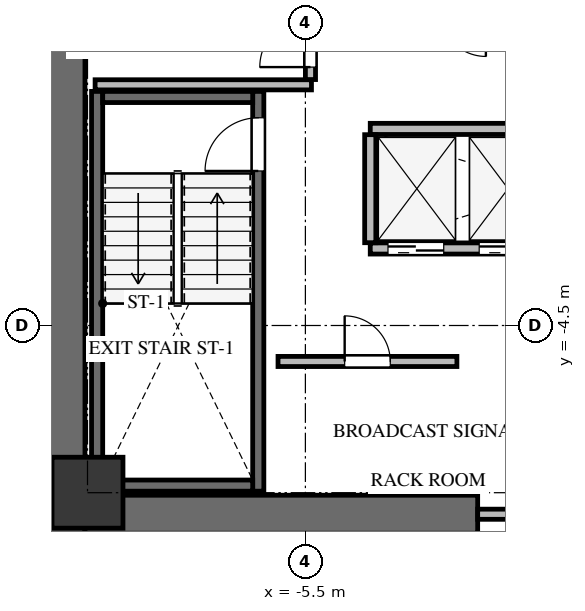
"""IFC4 building model, lengths in metres.
Left out: names, types, materials, properties, quantities, classifications, styles, units other than length and angle.
Written with IfcOpenShell. Run it as: python <this file> out.ifc"""

import sys

from ifc_helpers import new_model, si_unit, direction, frame, frame_2d, origin, origin_2d, place, context, subcontext, project, spatial, rectangle, extrude, source, transform, mapped, element, fill, save


model = new_model("IFC4")
c1 = context("Model", 3, precision=1e-05, world=origin(), true_north=direction((0.0, 1.0)))
c2 = subcontext(c1, "Body", "Model", "MODEL_VIEW")
j1 = project(units=[si_unit("LENGTHUNIT", "METRE"), si_unit("PLANEANGLEUNIT", "RADIAN")], contexts=[c1])
p1 = place(None, origin())
s1 = spatial("IfcSite", under=j1, at=p1, CompositionType="ELEMENT")
p2 = place(p1, origin())
s2 = spatial("IfcBuilding", under=s1, at=p2, CompositionType="ELEMENT")
p3 = place(p2, frame((0.0, 0.0, 114.0)))
s3 = spatial("IfcBuildingStorey", under=s2, at=p3, CompositionType="ELEMENT", Elevation=114.0)
p4 = place(p3, frame((-10.225, -8.6, 0.0), z_axis=(0.0, 0.0, 1.0), x_axis=(0.0, 1.0, 0.0)))
e1 = element("IfcWall", 1, at=p4, inside=s3, PredefinedType="SHEAR", context=c2, shape_type="SweptSolid", body=[
    extrude(rectangle(XDim=17.2, YDim=0.75, at=frame_2d((8.6, 0.0))), origin(), (0.0, 0.0, 1.0), 3.3),
])
p5 = place(p3, frame((-9.85, -8.225, 0.0), z_axis=(0.0, 0.0, 1.0), x_axis=(1.0, 0.0, 0.0)))
e2 = element("IfcWall", 2, at=p5, inside=s3, PredefinedType="SHEAR", context=c2, shape_type="SweptSolid", body=[
    extrude(rectangle(XDim=7.75, YDim=0.75, at=frame_2d((3.875, 0.0))), origin(), (0.0, 0.0, 1.0), 3.3),
])
p6 = place(p3, frame((-6.43, -7.77, -0.24), z_axis=(0.0, 0.0, 1.0), x_axis=(0.0, 1.0, 0.0)))
e3 = element("IfcWall", 3, at=p6, inside=s3, PredefinedType="SHEAR", context=c2, shape_type="SweptSolid", body=[
    extrude(rectangle(XDim=7.89, YDim=0.22, at=frame_2d((3.945, 0.0))), origin(), (0.0, 0.0, 1.0), 3.3),
])
p7 = place(p6, frame((6.32, 0.0, 0.0)))
e4 = element("IfcOpeningElement", 4, at=p7, cuts=e3, PredefinedType="OPENING", context=c2, shape_type="SweptSolid", body=[
    extrude(rectangle(XDim=1.05, YDim=2.15, at=frame_2d((0.525, 1.075))), frame((0.0, 0.12, 0.0), z_axis=(0.0, -1.0, 0.0), x_axis=(1.0, 0.0, 0.0)), (0.0, 0.0, 1.0), 0.24),
])
p8 = place(p3, frame((-9.61, 0.12, -0.24), z_axis=(0.0, 0.0, 1.0), x_axis=(0.0, -1.0, 0.0)))
e5 = element("IfcWall", 5, at=p8, inside=s3, PredefinedType="SHEAR", context=c2, shape_type="SweptSolid", body=[
    extrude(rectangle(XDim=7.89, YDim=0.22, at=frame_2d((3.945, 0.0))), origin(), (0.0, 0.0, 1.0), 3.3),
])
for number, where, z_axis, x_axis in (
    (6, (-9.5, -7.66, -0.24), (0.0, 0.0, 1.0), (1.0, 0.0, 0.0)),
    (7, (-6.54, 0.01, -0.24), (0.0, 0.0, 1.0), (-1.0, 0.0, 0.0)),
):
    element("IfcWall", number, at=place(p3, frame(where, z_axis=z_axis, x_axis=x_axis)), inside=s3, PredefinedType="SHEAR", context=c2, shape_type="SweptSolid", body=[
        extrude(rectangle(XDim=2.96, YDim=0.22, at=frame_2d((1.48, 0.0))), origin(), (0.0, 0.0, 1.0), 3.3),
    ])
m1 = source(origin(), c2, "Body", "SweptSolid", [
    extrude(rectangle(XDim=1.4, YDim=1.4, at=origin_2d()), origin(), (0.0, 0.0, 1.0), 3.3),
])
p9 = place(p3, frame((-9.8, -7.8, -0.24), z_axis=(0.0, 0.0, 1.0), x_axis=(1.0, 0.0, 0.0)))
e8 = element("IfcColumn", 8, at=p9, inside=s3, PredefinedType="COLUMN", context=c2, shape_type="MappedRepresentation", body=[
    mapped(m1, transform((0.0, 0.0, 0.0), x_axis=(1.0, 0.0, 0.0), y_axis=(0.0, 1.0, 0.0), z_axis=(0.0, 0.0, 1.0), scale=1.0)),
])
p10 = place(p3, frame((-2.1, -8.225, 0.0), z_axis=(0.0, 0.0, 1.0), x_axis=(1.0, 0.0, 0.0)))
e9 = element("IfcWall", 9, at=p10, inside=s3, PredefinedType="SOLIDWALL", context=c2, shape_type="SweptSolid", body=[
    extrude(rectangle(XDim=4.2, YDim=0.2, at=frame_2d((2.1, 0.0))), origin(), (0.0, 0.0, 1.0), 3.045),
])
p11 = place(p10, frame((1.2, 0.0, 0.0)))
e10 = element("IfcOpeningElement", 10, at=p11, cuts=e9, PredefinedType="OPENING", context=c2, shape_type="SweptSolid", body=[
    extrude(rectangle(XDim=1.8, YDim=2.15, at=frame_2d((0.9, 1.075))), frame((0.0, 0.11, 0.0), z_axis=(0.0, -1.0, 0.0), x_axis=(1.0, 0.0, 0.0)), (0.0, 0.0, 1.0), 0.22),
])
p12 = place(p3, frame((-9.65, 0.25, 0.0), z_axis=(0.0, 0.0, 1.0), x_axis=(1.0, 0.0, 0.0)))
e11 = element("IfcWall", 11, at=p12, inside=s3, PredefinedType="SOLIDWALL", context=c2, shape_type="SweptSolid", body=[
    extrude(rectangle(XDim=4.27, YDim=0.2, at=frame_2d((2.135, 0.0))), origin(), (0.0, 0.0, 1.0), 3.045),
])
p13 = place(p3, frame((-5.4, 0.354, 0.0), z_axis=(0.0, 0.0, 1.0), x_axis=(0.0, 1.0, 0.0)))
e12 = element("IfcWall", 12, at=p13, inside=s3, PredefinedType="SOLIDWALL", context=c2, shape_type="SweptSolid", body=[
    extrude(rectangle(XDim=4.026, YDim=0.2, at=frame_2d((2.013, 0.0))), origin(), (0.0, 0.0, 1.0), 3.045),
])
p14 = place(p13, frame((0.246, 0.0, 0.0)))
e13 = element("IfcOpeningElement", 13, at=p14, cuts=e12, PredefinedType="OPENING", context=c2, shape_type="SweptSolid", body=[
    extrude(rectangle(XDim=1.0, YDim=2.15, at=frame_2d((0.5, 1.075))), frame((0.0, 0.11, 0.0), z_axis=(0.0, -1.0, 0.0), x_axis=(1.0, 0.0, 0.0)), (0.0, 0.0, 1.0), 0.22),
])
p15 = place(p3, frame((-4.22, -2.98, 0.0), z_axis=(0.0, 0.0, 1.0), x_axis=(1.0, 0.0, 0.0)))
e14 = element("IfcWall", 14, at=p15, inside=s3, PredefinedType="SOLIDWALL", context=c2, shape_type="SweptSolid", body=[
    extrude(rectangle(XDim=7.24, YDim=0.22, at=frame_2d((3.62, 0.0))), origin(), (0.0, 0.0, 1.0), 3.045),
])
p16 = place(p15, frame((0.35, 0.0, 0.0)))
e15 = element("IfcOpeningElement", 15, at=p16, cuts=e14, PredefinedType="OPENING", context=c2, shape_type="SweptSolid", body=[
    extrude(rectangle(XDim=1.1, YDim=2.15, at=frame_2d((0.55, 1.075))), frame((0.0, 0.12, 0.0), z_axis=(0.0, -1.0, 0.0), x_axis=(1.0, 0.0, 0.0)), (0.0, 0.0, 1.0), 0.24),
])
p17 = place(p15, frame((2.15, 0.0, 0.0)))
e16 = element("IfcOpeningElement", 16, at=p17, cuts=e14, PredefinedType="OPENING", context=c2, shape_type="SweptSolid", body=[
    extrude(rectangle(XDim=1.1, YDim=2.15, at=frame_2d((0.55, 1.075))), frame((0.0, 0.12, 0.0), z_axis=(0.0, -1.0, 0.0), x_axis=(1.0, 0.0, 0.0)), (0.0, 0.0, 1.0), 0.24),
])
p18 = place(p15, frame((3.95, 0.0, 0.0)))
e17 = element("IfcOpeningElement", 17, at=p18, cuts=e14, PredefinedType="OPENING", context=c2, shape_type="SweptSolid", body=[
    extrude(rectangle(XDim=1.1, YDim=2.15, at=frame_2d((0.55, 1.075))), frame((0.0, 0.12, 0.0), z_axis=(0.0, -1.0, 0.0), x_axis=(1.0, 0.0, 0.0)), (0.0, 0.0, 1.0), 0.24),
])
p19 = place(p15, frame((5.75, 0.0, 0.0)))
e18 = element("IfcOpeningElement", 18, at=p19, cuts=e14, PredefinedType="OPENING", context=c2, shape_type="SweptSolid", body=[
    extrude(rectangle(XDim=1.1, YDim=2.15, at=frame_2d((0.55, 1.075))), frame((0.0, 0.12, 0.0), z_axis=(0.0, -1.0, 0.0), x_axis=(1.0, 0.0, 0.0)), (0.0, 0.0, 1.0), 0.24),
])
p20 = place(p3, frame((-4.22, -0.62, 0.0), z_axis=(0.0, 0.0, 1.0), x_axis=(1.0, 0.0, 0.0)))
e19 = element("IfcWall", 19, at=p20, inside=s3, PredefinedType="SOLIDWALL", context=c2, shape_type="SweptSolid", body=[
    extrude(rectangle(XDim=7.24, YDim=0.22, at=frame_2d((3.62, 0.0))), origin(), (0.0, 0.0, 1.0), 3.045),
])
p21 = place(p3, frame((-4.22, -2.866, 0.0), z_axis=(0.0, 0.0, 1.0), x_axis=(0.0, 1.0, 0.0)))
e20 = element("IfcWall", 20, at=p21, inside=s3, PredefinedType="SOLIDWALL", context=c2, shape_type="SweptSolid", body=[
    extrude(rectangle(XDim=2.132, YDim=0.22, at=frame_2d((1.066, 0.0))), origin(), (0.0, 0.0, 1.0), 3.045),
])
p22 = place(p3, frame((-6.04, -5.21, 0.0), z_axis=(0.0, 0.0, 1.0), x_axis=(1.0, 0.0, 0.0)))
e21 = element("IfcWall", 21, at=p22, inside=s3, PredefinedType="SOLIDWALL", context=c2, shape_type="SweptSolid", body=[
    extrude(rectangle(XDim=3.53, YDim=0.2, at=frame_2d((1.765, 0.0))), origin(), (0.0, 0.0, 1.0), 3.045),
])
p23 = place(p22, frame((1.315, 0.0, 0.0)))
e22 = element("IfcOpeningElement", 22, at=p23, cuts=e21, PredefinedType="OPENING", context=c2, shape_type="SweptSolid", body=[
    extrude(rectangle(XDim=0.9, YDim=2.05, at=frame_2d((0.45, 1.025))), frame((0.0, 0.11, 0.0), z_axis=(0.0, -1.0, 0.0), x_axis=(1.0, 0.0, 0.0)), (0.0, 0.0, 1.0), 0.22),
])
m2 = source(origin(), c2, "Body", "SweptSolid", [
    extrude(rectangle(XDim=1.05, YDim=2.15, at=frame_2d((0.525, 1.075))), frame((0.0, 0.025, 0.0), z_axis=(0.0, -1.0, 0.0), x_axis=(1.0, 0.0, 0.0)), (0.0, 0.0, 1.0), 0.05),
])
p24 = place(p7, origin())
e23 = element("IfcDoor", 23, at=p24, inside=s3, OperationType="SINGLE_SWING_LEFT", PredefinedType="DOOR", context=c2, shape_type="MappedRepresentation", body=[
    mapped(m2, transform((0.0, 0.0, 0.0), x_axis=(1.0, 0.0, 0.0), y_axis=(0.0, 1.0, 0.0), z_axis=(0.0, 0.0, 1.0), scale=1.0)),
])
fill(e4, e23)
m3 = source(origin(), c2, "Body", "SweptSolid", [
    extrude(rectangle(XDim=1.0, YDim=2.15, at=frame_2d((0.5, 1.075))), frame((0.0, 0.025, 0.0), z_axis=(0.0, -1.0, 0.0), x_axis=(1.0, 0.0, 0.0)), (0.0, 0.0, 1.0), 0.05),
])
p25 = place(p14, origin())
e24 = element("IfcDoor", 24, at=p25, inside=s3, OperationType="SINGLE_SWING_LEFT", PredefinedType="DOOR", context=c2, shape_type="MappedRepresentation", body=[
    mapped(m3, transform((0.0, 0.0, 0.0), x_axis=(1.0, 0.0, 0.0), y_axis=(0.0, 1.0, 0.0), z_axis=(0.0, 0.0, 1.0), scale=1.0)),
])
fill(e13, e24)
m4 = source(origin(), c2, "Body", "SweptSolid", [
    extrude(rectangle(XDim=1.1, YDim=2.15, at=frame_2d((0.55, 1.075))), frame((0.0, 0.025, 0.0), z_axis=(0.0, -1.0, 0.0), x_axis=(1.0, 0.0, 0.0)), (0.0, 0.0, 1.0), 0.05),
])
p26 = place(p16, origin())
e25 = element("IfcDoor", 25, at=p26, inside=s3, OperationType="DOUBLE_DOOR_SLIDING", PredefinedType="DOOR", context=c2, shape_type="MappedRepresentation", body=[
    mapped(m4, transform((0.0, 0.0, 0.0), x_axis=(1.0, 0.0, 0.0), y_axis=(0.0, 1.0, 0.0), z_axis=(0.0, 0.0, 1.0), scale=1.0)),
])
fill(e15, e25)
p27 = place(p17, origin())
e26 = element("IfcDoor", 26, at=p27, inside=s3, OperationType="DOUBLE_DOOR_SLIDING", PredefinedType="DOOR", context=c2, shape_type="MappedRepresentation", body=[
    mapped(m4, transform((0.0, 0.0, 0.0), x_axis=(1.0, 0.0, 0.0), y_axis=(0.0, 1.0, 0.0), z_axis=(0.0, 0.0, 1.0), scale=1.0)),
])
fill(e16, e26)
m5 = source(origin(), c2, "Body", "SweptSolid", [
    extrude(rectangle(XDim=0.9, YDim=2.05, at=frame_2d((0.45, 1.025))), frame((0.0, 0.025, 0.0), z_axis=(0.0, -1.0, 0.0), x_axis=(1.0, 0.0, 0.0)), (0.0, 0.0, 1.0), 0.05),
])
p28 = place(p23, origin())
e27 = element("IfcDoor", 27, at=p28, inside=s3, OperationType="SINGLE_SWING_LEFT", PredefinedType="DOOR", context=c2, shape_type="MappedRepresentation", body=[
    mapped(m5, transform((0.0, 0.0, 0.0), x_axis=(1.0, 0.0, 0.0), y_axis=(0.0, 1.0, 0.0), z_axis=(0.0, 0.0, 1.0), scale=1.0)),
])
fill(e22, e27)
save(model, sys.argv[1])
